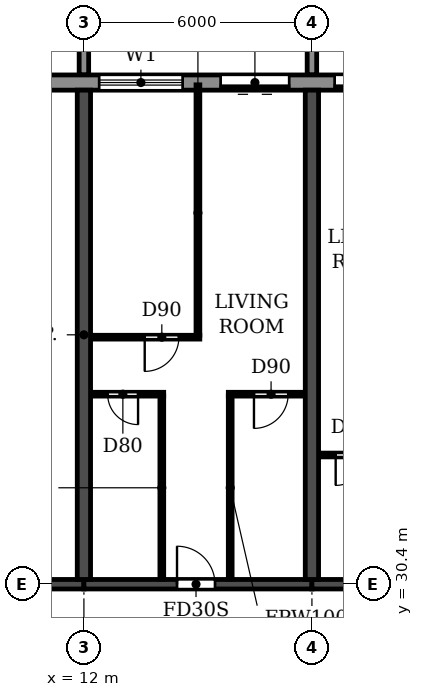
"""IFC4 building model, lengths in metres.
Left out: names, types, materials, properties, quantities, classifications, styles, units other than length and angle.
Written with IfcOpenShell. Run it as: python <this file> out.ifc"""

import sys

from ifc_helpers import new_model, si_unit, direction, frame, frame_2d, origin, place, context, subcontext, project, spatial, polyline, rectangle, outline, extrude, source, transform, mapped, element, fill, save


model = new_model("IFC4")
c1 = context("Model", 3, precision=1e-05, world=origin(), true_north=direction((0.0, 1.0)))
c2 = subcontext(c1, "Body", "Model", "MODEL_VIEW")
j1 = project(units=[si_unit("LENGTHUNIT", "METRE"), si_unit("PLANEANGLEUNIT", "RADIAN")], contexts=[c1])
p1 = place(None, origin())
s1 = spatial("IfcSite", under=j1, at=p1, CompositionType="ELEMENT")
p2 = place(p1, origin())
s2 = spatial("IfcBuilding", under=s1, at=p2, CompositionType="ELEMENT")
p3 = place(p2, frame((0.0, 0.0, 76.2)))
s3 = spatial("IfcBuildingStorey", under=s2, at=p3, CompositionType="ELEMENT", Elevation=76.2)
for number, where, z_axis, x_axis in (
    (1, (12.0, 30.525, 0.0), (0.0, 0.0, 1.0), (0.0, 1.0, 0.0)),
    (2, (18.0, 30.525, 0.0), (0.0, 0.0, 1.0), (0.0, 1.0, 0.0)),
):
    element("IfcWall", number, at=place(p3, frame(where, z_axis=z_axis, x_axis=x_axis)), inside=s3, PredefinedType="SHEAR", context=c2, shape_type="SweptSolid", body=[
        extrude(rectangle(XDim=12.875, YDim=0.35, at=frame_2d((6.438, 0.0))), origin(), (0.0, 0.0, 1.0), 3.06),
    ])
p4 = place(p3, frame((6.2, 30.4, 0.0), z_axis=(0.0, 0.0, 1.0), x_axis=(1.0, 0.0, 0.0)))
e3 = element("IfcWall", 3, at=p4, inside=s3, PredefinedType="SHEAR", context=c2, shape_type="SweptSolid", body=[
    extrude(rectangle(XDim=5.8, YDim=0.25, at=frame_2d((2.9, 0.0))), origin(), (0.0, 0.0, 1.0), 2.46),
])
p5 = place(p4, frame((2.3, 0.0, 0.0)))
e4 = element("IfcOpeningElement", 4, at=p5, cuts=e3, PredefinedType="OPENING", context=c2, shape_type="SweptSolid", body=[
    extrude(rectangle(XDim=1.0, YDim=2.1, at=frame_2d((0.5, 1.05))), frame((0.0, 0.135, 0.0), z_axis=(0.0, -1.0, 0.0), x_axis=(1.0, 0.0, 0.0)), (0.0, 0.0, 1.0), 0.27),
])
p6 = place(p3, frame((12.0, 30.4, 0.0), z_axis=(0.0, 0.0, 1.0), x_axis=(1.0, 0.0, 0.0)))
e5 = element("IfcWall", 5, at=p6, inside=s3, PredefinedType="SHEAR", context=c2, shape_type="SweptSolid", body=[
    extrude(rectangle(XDim=6.0, YDim=0.25, at=frame_2d((3.0, 0.0))), origin(), (0.0, 0.0, 1.0), 2.46),
])
p7 = place(p6, frame((2.45, 0.0, 0.0)))
e6 = element("IfcOpeningElement", 6, at=p7, cuts=e5, PredefinedType="OPENING", context=c2, shape_type="SweptSolid", body=[
    extrude(rectangle(XDim=1.0, YDim=2.1, at=frame_2d((0.5, 1.05))), frame((0.0, 0.135, 0.0), z_axis=(0.0, -1.0, 0.0), x_axis=(1.0, 0.0, 0.0)), (0.0, 0.0, 1.0), 0.27),
])
p8 = place(p3, frame((18.0, 30.4, 0.0), z_axis=(0.0, 0.0, 1.0), x_axis=(1.0, 0.0, 0.0)))
e7 = element("IfcWall", 7, at=p8, inside=s3, PredefinedType="SHEAR", context=c2, shape_type="SweptSolid", body=[
    extrude(rectangle(XDim=6.0, YDim=0.25, at=frame_2d((3.0, 0.0))), origin(), (0.0, 0.0, 1.0), 2.46),
])
p9 = place(p8, frame((2.45, 0.0, 0.0)))
e8 = element("IfcOpeningElement", 8, at=p9, cuts=e7, PredefinedType="OPENING", context=c2, shape_type="SweptSolid", body=[
    extrude(rectangle(XDim=1.0, YDim=2.1, at=frame_2d((0.5, 1.05))), frame((0.0, 0.135, 0.0), z_axis=(0.0, -1.0, 0.0), x_axis=(1.0, 0.0, 0.0)), (0.0, 0.0, 1.0), 0.27),
])
p10 = place(p3, frame((91.317, 43.6, 0.0), z_axis=(0.0, 0.0, 1.0), x_axis=(-1.0, 0.0, 0.0)))
e9 = element("IfcWall", 9, at=p10, inside=s3, PredefinedType="STANDARD", context=c2, shape_type="SweptSolid", body=[
    extrude(rectangle(XDim=80.634, YDim=0.4, at=frame_2d((40.317, 0.0))), origin(), (0.0, 0.0, 1.0), 3.06),
])
p11 = place(p10, frame((76.717, 0.0, 0.9)))
e10 = element("IfcOpeningElement", 10, at=p11, cuts=e9, PredefinedType="OPENING", context=c2, shape_type="SweptSolid", body=[
    extrude(rectangle(XDim=2.2, YDim=1.5, at=frame_2d((1.1, 0.75))), frame((0.0, 0.21, 0.0), z_axis=(0.0, -1.0, 0.0), x_axis=(1.0, 0.0, 0.0)), (0.0, 0.0, 1.0), 0.42),
])
p12 = place(p10, frame((73.917, 0.0, 0.0)))
e11 = element("IfcOpeningElement", 11, at=p12, cuts=e9, PredefinedType="OPENING", context=c2, shape_type="SweptSolid", body=[
    extrude(rectangle(XDim=1.8, YDim=2.4, at=frame_2d((0.9, 1.2))), frame((0.0, 0.21, 0.0), z_axis=(0.0, -1.0, 0.0), x_axis=(1.0, 0.0, 0.0)), (0.0, 0.0, 1.0), 0.42),
])
p13 = place(p10, frame((70.917, 0.0, 0.0)))
e12 = element("IfcOpeningElement", 12, at=p13, cuts=e9, PredefinedType="OPENING", context=c2, shape_type="SweptSolid", body=[
    extrude(rectangle(XDim=1.8, YDim=2.4, at=frame_2d((0.9, 1.2))), frame((0.0, 0.21, 0.0), z_axis=(0.0, -1.0, 0.0), x_axis=(1.0, 0.0, 0.0)), (0.0, 0.0, 1.0), 0.42),
])
p14 = place(p10, frame((67.717, 0.0, 0.9)))
e13 = element("IfcOpeningElement", 13, at=p14, cuts=e9, PredefinedType="OPENING", context=c2, shape_type="SweptSolid", body=[
    extrude(rectangle(XDim=2.2, YDim=1.5, at=frame_2d((1.1, 0.75))), frame((0.0, 0.21, 0.0), z_axis=(0.0, -1.0, 0.0), x_axis=(1.0, 0.0, 0.0)), (0.0, 0.0, 1.0), 0.42),
])
p15 = place(p10, frame((64.717, 0.0, 0.9)))
e14 = element("IfcOpeningElement", 14, at=p15, cuts=e9, PredefinedType="OPENING", context=c2, shape_type="SweptSolid", body=[
    extrude(rectangle(XDim=2.2, YDim=1.5, at=frame_2d((1.1, 0.75))), frame((0.0, 0.21, 0.0), z_axis=(0.0, -1.0, 0.0), x_axis=(1.0, 0.0, 0.0)), (0.0, 0.0, 1.0), 0.42),
])
p16 = place(p10, frame((61.917, 0.0, 0.0)))
e15 = element("IfcOpeningElement", 15, at=p16, cuts=e9, PredefinedType="OPENING", context=c2, shape_type="SweptSolid", body=[
    extrude(rectangle(XDim=1.8, YDim=2.4, at=frame_2d((0.9, 1.2))), frame((0.0, 0.21, 0.0), z_axis=(0.0, -1.0, 0.0), x_axis=(1.0, 0.0, 0.0)), (0.0, 0.0, 1.0), 0.42),
])
p17 = place(p10, frame((58.717, 0.0, 0.9)))
e16 = element("IfcOpeningElement", 16, at=p17, cuts=e9, PredefinedType="OPENING", context=c2, shape_type="SweptSolid", body=[
    extrude(rectangle(XDim=2.2, YDim=1.5, at=frame_2d((1.1, 0.75))), frame((0.0, 0.21, 0.0), z_axis=(0.0, -1.0, 0.0), x_axis=(1.0, 0.0, 0.0)), (0.0, 0.0, 1.0), 0.42),
])
p18 = place(p10, frame((55.917, 0.0, 0.0)))
e17 = element("IfcOpeningElement", 17, at=p18, cuts=e9, PredefinedType="OPENING", context=c2, shape_type="SweptSolid", body=[
    extrude(rectangle(XDim=1.8, YDim=2.4, at=frame_2d((0.9, 1.2))), frame((0.0, 0.21, 0.0), z_axis=(0.0, -1.0, 0.0), x_axis=(1.0, 0.0, 0.0)), (0.0, 0.0, 1.0), 0.42),
])
p19 = place(p10, frame((52.717, 0.0, 0.9)))
e18 = element("IfcOpeningElement", 18, at=p19, cuts=e9, PredefinedType="OPENING", context=c2, shape_type="SweptSolid", body=[
    extrude(rectangle(XDim=2.2, YDim=1.5, at=frame_2d((1.1, 0.75))), frame((0.0, 0.21, 0.0), z_axis=(0.0, -1.0, 0.0), x_axis=(1.0, 0.0, 0.0)), (0.0, 0.0, 1.0), 0.42),
])
p20 = place(p10, frame((49.717, 0.0, 0.9)))
e19 = element("IfcOpeningElement", 19, at=p20, cuts=e9, PredefinedType="OPENING", context=c2, shape_type="SweptSolid", body=[
    extrude(rectangle(XDim=2.2, YDim=1.5, at=frame_2d((1.1, 0.75))), frame((0.0, 0.21, 0.0), z_axis=(0.0, -1.0, 0.0), x_axis=(1.0, 0.0, 0.0)), (0.0, 0.0, 1.0), 0.42),
])
p21 = place(p10, frame((46.917, 0.0, 0.0)))
e20 = element("IfcOpeningElement", 20, at=p21, cuts=e9, PredefinedType="OPENING", context=c2, shape_type="SweptSolid", body=[
    extrude(rectangle(XDim=1.8, YDim=2.4, at=frame_2d((0.9, 1.2))), frame((0.0, 0.21, 0.0), z_axis=(0.0, -1.0, 0.0), x_axis=(1.0, 0.0, 0.0)), (0.0, 0.0, 1.0), 0.42),
])
p22 = place(p10, frame((43.717, 0.0, 0.9)))
e21 = element("IfcOpeningElement", 21, at=p22, cuts=e9, PredefinedType="OPENING", context=c2, shape_type="SweptSolid", body=[
    extrude(rectangle(XDim=2.2, YDim=1.5, at=frame_2d((1.1, 0.75))), frame((0.0, 0.21, 0.0), z_axis=(0.0, -1.0, 0.0), x_axis=(1.0, 0.0, 0.0)), (0.0, 0.0, 1.0), 0.42),
])
p23 = place(p10, frame((40.717, 0.0, 0.9)))
e22 = element("IfcOpeningElement", 22, at=p23, cuts=e9, PredefinedType="OPENING", context=c2, shape_type="SweptSolid", body=[
    extrude(rectangle(XDim=2.2, YDim=1.5, at=frame_2d((1.1, 0.75))), frame((0.0, 0.21, 0.0), z_axis=(0.0, -1.0, 0.0), x_axis=(1.0, 0.0, 0.0)), (0.0, 0.0, 1.0), 0.42),
])
p24 = place(p10, frame((37.917, 0.0, 0.0)))
e23 = element("IfcOpeningElement", 23, at=p24, cuts=e9, PredefinedType="OPENING", context=c2, shape_type="SweptSolid", body=[
    extrude(rectangle(XDim=1.8, YDim=2.4, at=frame_2d((0.9, 1.2))), frame((0.0, 0.21, 0.0), z_axis=(0.0, -1.0, 0.0), x_axis=(1.0, 0.0, 0.0)), (0.0, 0.0, 1.0), 0.42),
])
p25 = place(p10, frame((34.717, 0.0, 0.9)))
e24 = element("IfcOpeningElement", 24, at=p25, cuts=e9, PredefinedType="OPENING", context=c2, shape_type="SweptSolid", body=[
    extrude(rectangle(XDim=2.2, YDim=1.5, at=frame_2d((1.1, 0.75))), frame((0.0, 0.21, 0.0), z_axis=(0.0, -1.0, 0.0), x_axis=(1.0, 0.0, 0.0)), (0.0, 0.0, 1.0), 0.42),
])
p26 = place(p10, frame((31.917, 0.0, 0.0)))
e25 = element("IfcOpeningElement", 25, at=p26, cuts=e9, PredefinedType="OPENING", context=c2, shape_type="SweptSolid", body=[
    extrude(rectangle(XDim=1.8, YDim=2.4, at=frame_2d((0.9, 1.2))), frame((0.0, 0.21, 0.0), z_axis=(0.0, -1.0, 0.0), x_axis=(1.0, 0.0, 0.0)), (0.0, 0.0, 1.0), 0.42),
])
p27 = place(p10, frame((28.717, 0.0, 0.9)))
e26 = element("IfcOpeningElement", 26, at=p27, cuts=e9, PredefinedType="OPENING", context=c2, shape_type="SweptSolid", body=[
    extrude(rectangle(XDim=2.2, YDim=1.5, at=frame_2d((1.1, 0.75))), frame((0.0, 0.21, 0.0), z_axis=(0.0, -1.0, 0.0), x_axis=(1.0, 0.0, 0.0)), (0.0, 0.0, 1.0), 0.42),
])
p28 = place(p10, frame((25.717, 0.0, 0.9)))
e27 = element("IfcOpeningElement", 27, at=p28, cuts=e9, PredefinedType="OPENING", context=c2, shape_type="SweptSolid", body=[
    extrude(rectangle(XDim=2.2, YDim=1.5, at=frame_2d((1.1, 0.75))), frame((0.0, 0.21, 0.0), z_axis=(0.0, -1.0, 0.0), x_axis=(1.0, 0.0, 0.0)), (0.0, 0.0, 1.0), 0.42),
])
p29 = place(p10, frame((22.717, 0.0, 0.9)))
e28 = element("IfcOpeningElement", 28, at=p29, cuts=e9, PredefinedType="OPENING", context=c2, shape_type="SweptSolid", body=[
    extrude(rectangle(XDim=2.2, YDim=1.5, at=frame_2d((1.1, 0.75))), frame((0.0, 0.21, 0.0), z_axis=(0.0, -1.0, 0.0), x_axis=(1.0, 0.0, 0.0)), (0.0, 0.0, 1.0), 0.42),
])
p30 = place(p10, frame((19.917, 0.0, 0.0)))
e29 = element("IfcOpeningElement", 29, at=p30, cuts=e9, PredefinedType="OPENING", context=c2, shape_type="SweptSolid", body=[
    extrude(rectangle(XDim=1.8, YDim=2.4, at=frame_2d((0.9, 1.2))), frame((0.0, 0.21, 0.0), z_axis=(0.0, -1.0, 0.0), x_axis=(1.0, 0.0, 0.0)), (0.0, 0.0, 1.0), 0.42),
])
p31 = place(p10, frame((16.717, 0.0, 0.9)))
e30 = element("IfcOpeningElement", 30, at=p31, cuts=e9, PredefinedType="OPENING", context=c2, shape_type="SweptSolid", body=[
    extrude(rectangle(XDim=2.2, YDim=1.5, at=frame_2d((1.1, 0.75))), frame((0.0, 0.21, 0.0), z_axis=(0.0, -1.0, 0.0), x_axis=(1.0, 0.0, 0.0)), (0.0, 0.0, 1.0), 0.42),
])
p32 = place(p10, frame((13.717, 0.0, 0.9)))
e31 = element("IfcOpeningElement", 31, at=p32, cuts=e9, PredefinedType="OPENING", context=c2, shape_type="SweptSolid", body=[
    extrude(rectangle(XDim=2.2, YDim=1.5, at=frame_2d((1.1, 0.75))), frame((0.0, 0.21, 0.0), z_axis=(0.0, -1.0, 0.0), x_axis=(1.0, 0.0, 0.0)), (0.0, 0.0, 1.0), 0.42),
])
p33 = place(p10, frame((10.717, 0.0, 0.9)))
e32 = element("IfcOpeningElement", 32, at=p33, cuts=e9, PredefinedType="OPENING", context=c2, shape_type="SweptSolid", body=[
    extrude(rectangle(XDim=2.2, YDim=1.5, at=frame_2d((1.1, 0.75))), frame((0.0, 0.21, 0.0), z_axis=(0.0, -1.0, 0.0), x_axis=(1.0, 0.0, 0.0)), (0.0, 0.0, 1.0), 0.42),
])
p34 = place(p10, frame((7.917, 0.0, 0.0)))
e33 = element("IfcOpeningElement", 33, at=p34, cuts=e9, PredefinedType="OPENING", context=c2, shape_type="SweptSolid", body=[
    extrude(rectangle(XDim=1.8, YDim=2.4, at=frame_2d((0.9, 1.2))), frame((0.0, 0.21, 0.0), z_axis=(0.0, -1.0, 0.0), x_axis=(1.0, 0.0, 0.0)), (0.0, 0.0, 1.0), 0.42),
])
p35 = place(p10, frame((4.717, 0.0, 0.9)))
e34 = element("IfcOpeningElement", 34, at=p35, cuts=e9, PredefinedType="OPENING", context=c2, shape_type="SweptSolid", body=[
    extrude(rectangle(XDim=2.2, YDim=1.5, at=frame_2d((1.1, 0.75))), frame((0.0, 0.21, 0.0), z_axis=(0.0, -1.0, 0.0), x_axis=(1.0, 0.0, 0.0)), (0.0, 0.0, 1.0), 0.42),
])
p36 = place(p10, frame((1.917, 0.0, 0.0)))
e35 = element("IfcOpeningElement", 35, at=p36, cuts=e9, PredefinedType="OPENING", context=c2, shape_type="SweptSolid", body=[
    extrude(rectangle(XDim=1.8, YDim=2.4, at=frame_2d((0.9, 1.2))), frame((0.0, 0.21, 0.0), z_axis=(0.0, -1.0, 0.0), x_axis=(1.0, 0.0, 0.0)), (0.0, 0.0, 1.0), 0.42),
])
m1 = source(origin(), c2, "Body", "SweptSolid", [
    extrude(outline(polyline([(0.0, 0.0), (0.25, 0.0), (0.25, 3.1), (0.0, 3.1), (0.0, 0.0)])), origin(), (0.0, 0.0, 1.0), 3.1),
])
for number, where in (
    (36, (11.875, 43.8, 0.0)),
    (37, (17.875, 43.8, 0.0)),
):
    element("IfcWall", number, at=place(p3, frame(where)), inside=s3, PredefinedType="STANDARD", context=c2, shape_type="MappedRepresentation", body=[
        mapped(m1, transform((0.0, 0.0, 0.0))),
    ])
p37 = place(p3, frame((18.185, 33.8, 0.0), z_axis=(0.0, 0.0, 1.0), x_axis=(1.0, 0.0, 0.0)))
e38 = element("IfcWall", 38, at=p37, inside=s3, PredefinedType="PARTITIONING", context=c2, shape_type="SweptSolid", body=[
    extrude(rectangle(XDim=1.915, YDim=0.1, at=frame_2d((0.958, 0.0))), origin(), (0.0, 0.0, 1.0), 3.06),
])
p38 = place(p37, frame((0.44, 0.0, 0.0)))
e39 = element("IfcOpeningElement", 39, at=p38, cuts=e38, PredefinedType="OPENING", context=c2, shape_type="SweptSolid", body=[
    extrude(rectangle(XDim=0.8, YDim=2.1, at=frame_2d((0.4, 1.05))), frame((0.0, 0.06, 0.0), z_axis=(0.0, -1.0, 0.0), x_axis=(1.0, 0.0, 0.0)), (0.0, 0.0, 1.0), 0.12),
])
p39 = place(p3, frame((12.185, 35.4, 0.0), z_axis=(0.0, 0.0, 1.0), x_axis=(1.0, 0.0, 0.0)))
e40 = element("IfcWall", 40, at=p39, inside=s3, PredefinedType="PARTITIONING", context=c2, shape_type="SweptSolid", body=[
    extrude(rectangle(XDim=1.915, YDim=0.1, at=frame_2d((0.958, 0.0))), origin(), (0.0, 0.0, 1.0), 3.06),
])
p40 = place(p39, frame((0.44, 0.0, 0.0)))
e41 = element("IfcOpeningElement", 41, at=p40, cuts=e40, PredefinedType="OPENING", context=c2, shape_type="SweptSolid", body=[
    extrude(rectangle(XDim=0.8, YDim=2.1, at=frame_2d((0.4, 1.05))), frame((0.0, 0.06, 0.0), z_axis=(0.0, -1.0, 0.0), x_axis=(1.0, 0.0, 0.0)), (0.0, 0.0, 1.0), 0.12),
])
p41 = place(p3, frame((15.8, 35.4, 0.0), z_axis=(0.0, 0.0, 1.0), x_axis=(1.0, 0.0, 0.0)))
e42 = element("IfcWall", 42, at=p41, inside=s3, PredefinedType="PARTITIONING", context=c2, shape_type="SweptSolid", body=[
    extrude(rectangle(XDim=2.015, YDim=0.1, at=frame_2d((1.007, 0.0))), origin(), (0.0, 0.0, 1.0), 3.06),
])
p42 = place(p41, frame((0.675, 0.0, 0.0)))
e43 = element("IfcOpeningElement", 43, at=p42, cuts=e42, PredefinedType="OPENING", context=c2, shape_type="SweptSolid", body=[
    extrude(rectangle(XDim=0.9, YDim=2.1, at=frame_2d((0.45, 1.05))), frame((0.0, 0.06, 0.0), z_axis=(0.0, -1.0, 0.0), x_axis=(1.0, 0.0, 0.0)), (0.0, 0.0, 1.0), 0.12),
])
p43 = place(p3, frame((12.185, 36.9, 0.0), z_axis=(0.0, 0.0, 1.0), x_axis=(1.0, 0.0, 0.0)))
e44 = element("IfcWall", 44, at=p43, inside=s3, PredefinedType="PARTITIONING", context=c2, shape_type="SweptSolid", body=[
    extrude(rectangle(XDim=2.865, YDim=0.1, at=frame_2d((1.433, 0.0))), origin(), (0.0, 0.0, 1.0), 3.06),
])
p44 = place(p43, frame((1.415, 0.0, 0.0)))
e45 = element("IfcOpeningElement", 45, at=p44, cuts=e44, PredefinedType="OPENING", context=c2, shape_type="SweptSolid", body=[
    extrude(rectangle(XDim=0.9, YDim=2.1, at=frame_2d((0.45, 1.05))), frame((0.0, 0.06, 0.0), z_axis=(0.0, -1.0, 0.0), x_axis=(1.0, 0.0, 0.0)), (0.0, 0.0, 1.0), 0.12),
])
p45 = place(p3, frame((14.05, 30.535, 0.0), z_axis=(0.0, 0.0, 1.0), x_axis=(0.0, 1.0, 0.0)))
e46 = element("IfcWall", 46, at=p45, inside=s3, PredefinedType="PARTITIONING", context=c2, shape_type="SweptSolid", body=[
    extrude(rectangle(XDim=4.815, YDim=0.1, at=frame_2d((2.408, 0.0))), origin(), (0.0, 0.0, 1.0), 3.06),
])
p46 = place(p3, frame((15.0, 36.95, 0.0), z_axis=(0.0, 0.0, 1.0), x_axis=(0.0, 1.0, 0.0)))
e47 = element("IfcWall", 47, at=p46, inside=s3, PredefinedType="PARTITIONING", context=c2, shape_type="SweptSolid", body=[
    extrude(rectangle(XDim=6.59, YDim=0.1, at=frame_2d((3.295, 0.0))), origin(), (0.0, 0.0, 1.0), 3.06),
])
p47 = place(p3, frame((15.85, 30.535, 0.0), z_axis=(0.0, 0.0, 1.0), x_axis=(0.0, 1.0, 0.0)))
e48 = element("IfcWall", 48, at=p47, inside=s3, PredefinedType="PARTITIONING", context=c2, shape_type="SweptSolid", body=[
    extrude(rectangle(XDim=4.815, YDim=0.1, at=frame_2d((2.408, 0.0))), origin(), (0.0, 0.0, 1.0), 3.06),
])
p48 = place(p11, origin())
e49 = element("IfcWindow", 49, at=p48, inside=s3, PartitioningType="DOUBLE_PANEL_HORIZONTAL", PredefinedType="WINDOW", context=c2, shape_type="SweptSolid", body=[
    extrude(rectangle(XDim=2.2, YDim=1.5, at=frame_2d((1.1, 0.75))), frame((0.0, 0.03, 0.0), z_axis=(0.0, -1.0, 0.0), x_axis=(1.0, 0.0, 0.0)), (0.0, 0.0, 1.0), 0.06),
])
fill(e10, e49)
p49 = place(p12, origin())
e50 = element("IfcDoor", 50, at=p49, inside=s3, OperationType="DOUBLE_DOOR_SLIDING", PredefinedType="DOOR", context=c2, shape_type="SweptSolid", body=[
    extrude(rectangle(XDim=1.8, YDim=2.4, at=frame_2d((0.9, 1.2))), frame((0.0, 0.025, 0.0), z_axis=(0.0, -1.0, 0.0), x_axis=(1.0, 0.0, 0.0)), (0.0, 0.0, 1.0), 0.05),
])
fill(e11, e50)
p50 = place(p13, origin())
e51 = element("IfcDoor", 51, at=p50, inside=s3, OperationType="DOUBLE_DOOR_SLIDING", PredefinedType="DOOR", context=c2, shape_type="SweptSolid", body=[
    extrude(rectangle(XDim=1.8, YDim=2.4, at=frame_2d((0.9, 1.2))), frame((0.0, 0.025, 0.0), z_axis=(0.0, -1.0, 0.0), x_axis=(1.0, 0.0, 0.0)), (0.0, 0.0, 1.0), 0.05),
])
fill(e12, e51)
p51 = place(p40, frame((0.8, 0.0, 0.0), z_axis=(0.0, 0.0, 1.0), x_axis=(-1.0, 0.0, 0.0)))
e52 = element("IfcDoor", 52, at=p51, inside=s3, OperationType="SINGLE_SWING_LEFT", PredefinedType="DOOR", context=c2, shape_type="SweptSolid", body=[
    extrude(rectangle(XDim=0.8, YDim=2.1, at=frame_2d((0.4, 1.05))), frame((0.0, 0.025, 0.0), z_axis=(0.0, -1.0, 0.0), x_axis=(1.0, 0.0, 0.0)), (0.0, 0.0, 1.0), 0.05),
])
fill(e41, e52)
p52 = place(p44, frame((0.9, 0.0, 0.0), z_axis=(0.0, 0.0, 1.0), x_axis=(-1.0, 0.0, 0.0)))
e53 = element("IfcDoor", 53, at=p52, inside=s3, OperationType="SINGLE_SWING_RIGHT", PredefinedType="DOOR", context=c2, shape_type="SweptSolid", body=[
    extrude(rectangle(XDim=0.9, YDim=2.1, at=frame_2d((0.45, 1.05))), frame((0.0, 0.025, 0.0), z_axis=(0.0, -1.0, 0.0), x_axis=(1.0, 0.0, 0.0)), (0.0, 0.0, 1.0), 0.05),
])
fill(e45, e53)
p53 = place(p7, origin())
e54 = element("IfcDoor", 54, at=p53, inside=s3, OperationType="SINGLE_SWING_LEFT", PredefinedType="DOOR", context=c2, shape_type="SweptSolid", body=[
    extrude(rectangle(XDim=1.0, YDim=2.1, at=frame_2d((0.5, 1.05))), frame((0.0, 0.025, 0.0), z_axis=(0.0, -1.0, 0.0), x_axis=(1.0, 0.0, 0.0)), (0.0, 0.0, 1.0), 0.05),
])
fill(e6, e54)
p54 = place(p42, frame((0.9, 0.0, 0.0), z_axis=(0.0, 0.0, 1.0), x_axis=(-1.0, 0.0, 0.0)))
e55 = element("IfcDoor", 55, at=p54, inside=s3, OperationType="SINGLE_SWING_RIGHT", PredefinedType="DOOR", context=c2, shape_type="SweptSolid", body=[
    extrude(rectangle(XDim=0.9, YDim=2.1, at=frame_2d((0.45, 1.05))), frame((0.0, 0.025, 0.0), z_axis=(0.0, -1.0, 0.0), x_axis=(1.0, 0.0, 0.0)), (0.0, 0.0, 1.0), 0.05),
])
fill(e43, e55)
p55 = place(p38, frame((0.8, 0.0, 0.0), z_axis=(0.0, 0.0, 1.0), x_axis=(-1.0, 0.0, 0.0)))
e56 = element("IfcDoor", 56, at=p55, inside=s3, OperationType="SINGLE_SWING_RIGHT", PredefinedType="DOOR", context=c2, shape_type="SweptSolid", body=[
    extrude(rectangle(XDim=0.8, YDim=2.1, at=frame_2d((0.4, 1.05))), frame((0.0, 0.025, 0.0), z_axis=(0.0, -1.0, 0.0), x_axis=(1.0, 0.0, 0.0)), (0.0, 0.0, 1.0), 0.05),
])
fill(e39, e56)
save(model, sys.argv[1])
